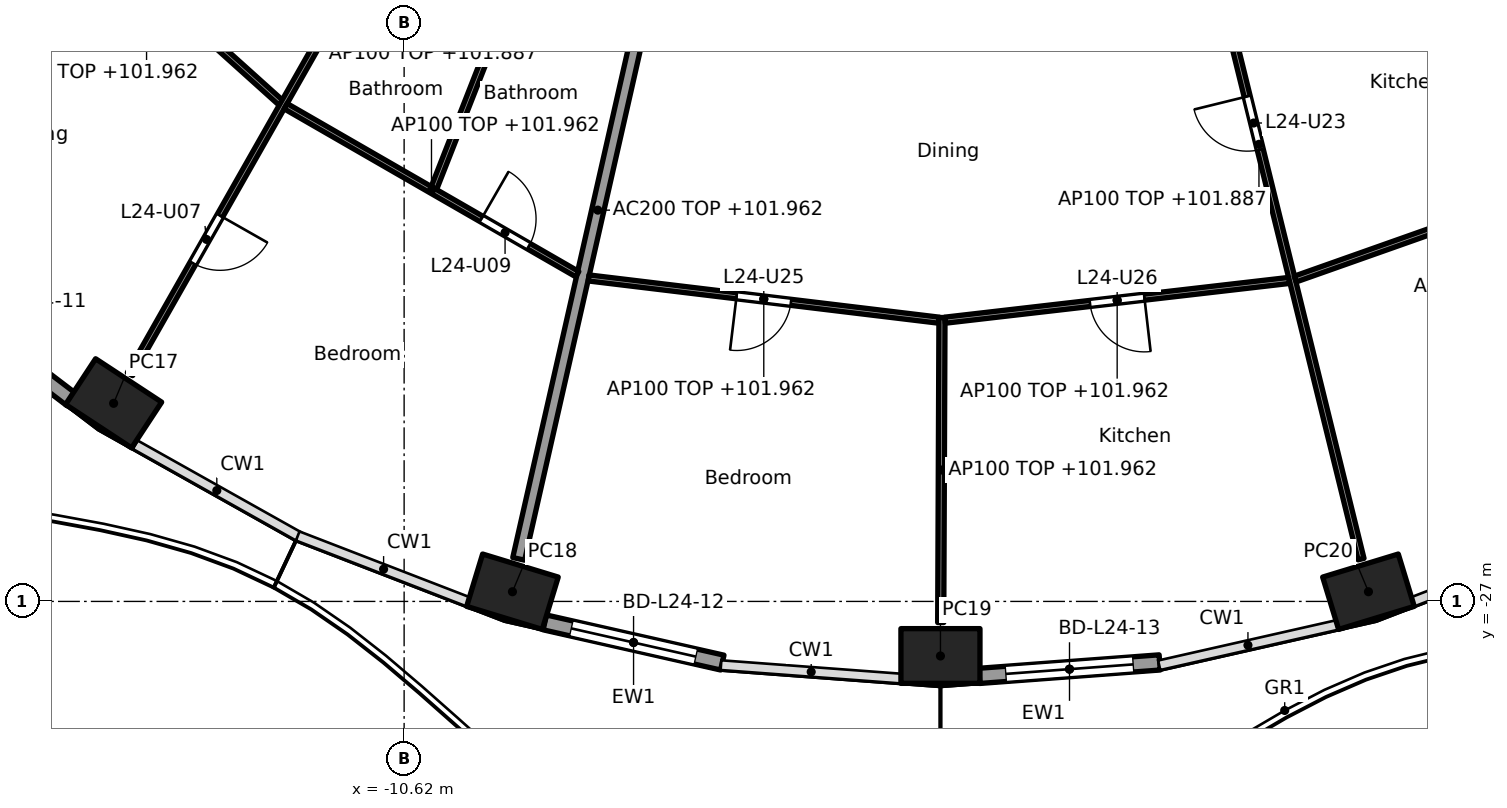
"""IFC4 building model, lengths in metres.
Left out: names, types, materials, properties, quantities, classifications, styles, units other than length and angle.
Written with IfcOpenShell. Run it as: python <this file> out.ifc"""

import sys

from ifc_helpers import new_model, si_unit, direction, frame, frame_2d, origin, origin_2d, place, context, subcontext, project, spatial, rectangle, hollow_rectangle, extrude, element, fill, save


model = new_model("IFC4")
c1 = context("Model", 3, precision=1e-05, world=origin(), true_north=direction((0.0, 1.0)))
c2 = subcontext(c1, "Body", "Model", "MODEL_VIEW")
j1 = project(units=[si_unit("LENGTHUNIT", "METRE"), si_unit("PLANEANGLEUNIT", "RADIAN")], contexts=[c1])
p1 = place(None, origin())
s1 = spatial("IfcSite", under=j1, at=p1, CompositionType="ELEMENT")
p2 = place(p1, origin())
s2 = spatial("IfcBuilding", under=s1, at=p2, CompositionType="ELEMENT")
p3 = place(p2, frame((0.0, 0.0, 99.2)))
s3 = spatial("IfcBuildingStorey", under=s2, at=p3, CompositionType="ELEMENT", Elevation=99.2)
for number, where, z_axis, x_axis in (
    (1, (-15.397, -23.742, 0.0), (0.0, 0.0, 1.0), (0.836, -0.549, 0.0)),
    (2, (-8.839, -26.841, 0.0), (0.0, 0.0, 1.0), (0.957, -0.292, 0.0)),
    (3, (-1.8, -27.897, 0.0), (0.0, 0.0, 1.0), (1.0, 0.0, 0.0)),
    (4, (5.239, -26.841, 0.0), (0.0, 0.0, 1.0), (0.957, 0.292, 0.0)),
):
    element("IfcColumn", number, at=place(p3, frame(where, z_axis=z_axis, x_axis=x_axis)), inside=s3, PredefinedType="COLUMN", context=c2, shape_type="SweptSolid", body=[
        extrude(hollow_rectangle(XDim=1.3, YDim=0.9, WallThickness=0.045, at=origin_2d()), origin(), (0.0, 0.0, 1.0), 3.7),
    ])
p4 = place(p3, frame((-16.089, -23.682, 0.0), z_axis=(0.0, 0.0, 1.0), x_axis=(-0.796037575978, 0.605247203736, 0.0)))
e5 = element("IfcWall", 5, at=p4, inside=s3, PredefinedType="SOLIDWALL", context=c2, shape_type="SweptSolid", body=[
    extrude(rectangle(XDim=3.134, YDim=0.25, at=frame_2d((1.567, 0.0))), origin(), (0.0, 0.0, 1.0), 3.44),
])
p5 = place(p4, frame((0.517, 0.0, 0.0)))
e6 = element("IfcOpeningElement", 6, at=p5, cuts=e5, PredefinedType="OPENING", context=c2, shape_type="SweptSolid", body=[
    extrude(rectangle(XDim=2.1, YDim=2.4, at=frame_2d((1.05, 1.2))), frame((0.0, 0.135, 0.0), z_axis=(0.0, -1.0, 0.0), x_axis=(1.0, 0.0, 0.0)), (0.0, 0.0, 1.0), 0.27),
])
p6 = place(p3, frame((-5.387, -28.006, 0.0), z_axis=(0.0, 0.0, 1.0), x_axis=(-0.975317607872, 0.220806620767, 0.0)))
e7 = element("IfcWall", 7, at=p6, inside=s3, PredefinedType="SOLIDWALL", context=c2, shape_type="SweptSolid", body=[
    extrude(rectangle(XDim=2.993, YDim=0.25, at=frame_2d((1.497, 0.0))), origin(), (0.0, 0.0, 1.0), 3.44),
])
p7 = place(p6, frame((0.447, 0.0, 0.0)))
e8 = element("IfcOpeningElement", 8, at=p7, cuts=e7, PredefinedType="OPENING", context=c2, shape_type="SweptSolid", body=[
    extrude(rectangle(XDim=2.1, YDim=2.4, at=frame_2d((1.05, 1.2))), frame((0.0, 0.135, 0.0), z_axis=(0.0, -1.0, 0.0), x_axis=(1.0, 0.0, 0.0)), (0.0, 0.0, 1.0), 0.27),
])
p8 = place(p3, frame((1.806, -28.003, 0.0), z_axis=(0.0, 0.0, 1.0), x_axis=(-0.997226174467, -0.074430887117, 0.0)))
e9 = element("IfcWall", 9, at=p8, inside=s3, PredefinedType="SOLIDWALL", context=c2, shape_type="SweptSolid", body=[
    extrude(rectangle(XDim=2.975, YDim=0.25, at=frame_2d((1.488, 0.0))), origin(), (0.0, 0.0, 1.0), 3.44),
])
p9 = place(p8, frame((0.438, 0.0, 0.0)))
e10 = element("IfcOpeningElement", 10, at=p9, cuts=e9, PredefinedType="OPENING", context=c2, shape_type="SweptSolid", body=[
    extrude(rectangle(XDim=2.1, YDim=2.4, at=frame_2d((1.05, 1.2))), frame((0.0, 0.135, 0.0), z_axis=(0.0, -1.0, 0.0), x_axis=(1.0, 0.0, 0.0)), (0.0, 0.0, 1.0), 0.27),
])
p10 = place(p3, frame((-6.134, -14.831, 0.0), z_axis=(0.0, 0.0, 1.0), x_axis=(-0.221225405869, -0.975222702667, 0.0)))
e11 = element("IfcWall", 11, at=p10, inside=s3, PredefinedType="PARTITIONING", context=c2, shape_type="SweptSolid", body=[
    extrude(rectangle(XDim=11.761, YDim=0.2, at=frame_2d((5.88, 0.0))), origin(), (0.0, 0.0, 1.0), 2.762),
])
p11 = place(p3, frame((-17.063, -14.827, 0.0), z_axis=(0.0, 0.0, 1.0), x_axis=(0.743478142868, -0.668760234373, 0.0)))
e12 = element("IfcWall", 12, at=p11, inside=s3, PredefinedType="PARTITIONING", context=c2, shape_type="SweptSolid", body=[
    extrude(rectangle(XDim=5.937, YDim=0.1, at=frame_2d((2.969, 0.0))), origin(), (0.0, 0.0, 1.0), 2.762),
])
p12 = place(p11, frame((2.519, 0.0, 0.0)))
e13 = element("IfcOpeningElement", 13, at=p12, cuts=e12, PredefinedType="OPENING", context=c2, shape_type="SweptSolid", body=[
    extrude(rectangle(XDim=0.9, YDim=2.1, at=frame_2d((0.45, 1.05))), frame((0.0, 0.06, 0.0), z_axis=(0.0, -1.0, 0.0), x_axis=(1.0, 0.0, 0.0)), (0.0, 0.0, 1.0), 0.12),
])
p13 = place(p3, frame((-7.707, -10.198, 0.0), z_axis=(0.0, 0.0, 1.0), x_axis=(-0.49395524734, -0.869487328042, 0.0)))
e14 = element("IfcWall", 14, at=p13, inside=s3, PredefinedType="PARTITIONING", context=c2, shape_type="SweptSolid", body=[
    extrude(rectangle(XDim=15.025, YDim=0.1, at=frame_2d((7.512, 0.0))), origin(), (0.0, 0.0, 1.0), 2.687),
])
p14 = place(p13, frame((1.684, 0.0, 0.0)))
e15 = element("IfcOpeningElement", 15, at=p14, cuts=e14, PredefinedType="OPENING", context=c2, shape_type="SweptSolid", body=[
    extrude(rectangle(XDim=0.9, YDim=2.1, at=frame_2d((0.45, 1.05))), frame((0.0, 0.06, 0.0), z_axis=(0.0, -1.0, 0.0), x_axis=(1.0, 0.0, 0.0)), (0.0, 0.0, 1.0), 0.12),
])
p15 = place(p13, frame((6.648, 0.0, 0.0)))
e16 = element("IfcOpeningElement", 16, at=p15, cuts=e14, PredefinedType="OPENING", context=c2, shape_type="SweptSolid", body=[
    extrude(rectangle(XDim=0.9, YDim=2.1, at=frame_2d((0.45, 1.05))), frame((0.0, 0.06, 0.0), z_axis=(0.0, -1.0, 0.0), x_axis=(1.0, 0.0, 0.0)), (0.0, 0.0, 1.0), 0.12),
])
p16 = place(p13, frame((12.027, 0.0, 0.0)))
e17 = element("IfcOpeningElement", 17, at=p16, cuts=e14, PredefinedType="OPENING", context=c2, shape_type="SweptSolid", body=[
    extrude(rectangle(XDim=0.9, YDim=2.1, at=frame_2d((0.45, 1.05))), frame((0.0, 0.06, 0.0), z_axis=(0.0, -1.0, 0.0), x_axis=(1.0, 0.0, 0.0)), (0.0, 0.0, 1.0), 0.12),
])
p17 = place(p3, frame((-12.568, -18.856, 0.0), z_axis=(0.0, 0.0, 1.0), x_axis=(0.866533437451, -0.499119025664, 0.0)))
e18 = element("IfcWall", 18, at=p17, inside=s3, PredefinedType="PARTITIONING", context=c2, shape_type="SweptSolid", body=[
    extrude(rectangle(XDim=5.535, YDim=0.1, at=frame_2d((2.768, 0.0))), origin(), (0.0, 0.0, 1.0), 2.762),
])
p18 = place(p17, frame((3.714, 0.0, 0.0)))
e19 = element("IfcOpeningElement", 19, at=p18, cuts=e18, PredefinedType="OPENING", context=c2, shape_type="SweptSolid", body=[
    extrude(rectangle(XDim=0.9, YDim=2.1, at=frame_2d((0.45, 1.05))), frame((0.0, 0.06, 0.0), z_axis=(0.0, -1.0, 0.0), x_axis=(1.0, 0.0, 0.0)), (0.0, 0.0, 1.0), 0.12),
])
p19 = place(p3, frame((-8.177, -15.231, 0.0), z_axis=(0.0, 0.0, 1.0), x_axis=(-0.365520869553, -0.930803144559, 0.0)))
e20 = element("IfcWall", 20, at=p19, inside=s3, PredefinedType="PARTITIONING", context=c2, shape_type="SweptSolid", body=[
    extrude(rectangle(XDim=5.342, YDim=0.1, at=frame_2d((2.671, 0.0))), origin(), (0.0, 0.0, 1.0), 3.44),
])
p20 = place(p3, frame((-7.586, -21.68, 0.0), z_axis=(0.0, 0.0, 1.0), x_axis=(0.992810189026, -0.119699325668, 0.0)))
e21 = element("IfcWall", 21, at=p20, inside=s3, PredefinedType="PARTITIONING", context=c2, shape_type="SweptSolid", body=[
    extrude(rectangle(XDim=5.803, YDim=0.1, at=frame_2d((2.901, 0.0))), origin(), (0.0, 0.0, 1.0), 2.762),
])
p21 = place(p20, frame((2.451, 0.0, 0.0)))
e22 = element("IfcOpeningElement", 22, at=p21, cuts=e21, PredefinedType="OPENING", context=c2, shape_type="SweptSolid", body=[
    extrude(rectangle(XDim=0.9, YDim=2.1, at=frame_2d((0.45, 1.05))), frame((0.0, 0.06, 0.0), z_axis=(0.0, -1.0, 0.0), x_axis=(1.0, 0.0, 0.0)), (0.0, 0.0, 1.0), 0.12),
])
p22 = place(p3, frame((-1.775, -22.331, 0.0), z_axis=(0.0, 0.0, 1.0), x_axis=(-0.004088153894, -0.999991643464, 0.0)))
e23 = element("IfcWall", 23, at=p22, inside=s3, PredefinedType="PARTITIONING", context=c2, shape_type="SweptSolid", body=[
    extrude(rectangle(XDim=5.016, YDim=0.1, at=frame_2d((2.508, 0.0))), origin(), (0.0, 0.0, 1.0), 2.762),
])
p23 = place(p3, frame((-1.726, -22.375, 0.0), z_axis=(0.0, 0.0, 1.0), x_axis=(0.99339223329, 0.114768771187, 0.0)))
e24 = element("IfcWall", 24, at=p23, inside=s3, PredefinedType="PARTITIONING", context=c2, shape_type="SweptSolid", body=[
    extrude(rectangle(XDim=5.701, YDim=0.1, at=frame_2d((2.851, 0.0))), origin(), (0.0, 0.0, 1.0), 2.762),
])
p24 = place(p23, frame((2.4, 0.0, 0.0)))
e25 = element("IfcOpeningElement", 25, at=p24, cuts=e24, PredefinedType="OPENING", context=c2, shape_type="SweptSolid", body=[
    extrude(rectangle(XDim=0.9, YDim=2.1, at=frame_2d((0.45, 1.05))), frame((0.0, 0.06, 0.0), z_axis=(0.0, -1.0, 0.0), x_axis=(1.0, 0.0, 0.0)), (0.0, 0.0, 1.0), 0.12),
])
p25 = place(p3, frame((1.759, -12.662, 0.0), z_axis=(0.0, 0.0, 1.0), x_axis=(0.239021819854, -0.971014196412, 0.0)))
e26 = element("IfcWall", 26, at=p25, inside=s3, PredefinedType="PARTITIONING", context=c2, shape_type="SweptSolid", body=[
    extrude(rectangle(XDim=14.05, YDim=0.1, at=frame_2d((7.025, 0.0))), origin(), (0.0, 0.0, 1.0), 2.687),
])
p26 = place(p25, frame((6.214, 0.0, 0.0)))
e27 = element("IfcOpeningElement", 27, at=p26, cuts=e26, PredefinedType="OPENING", context=c2, shape_type="SweptSolid", body=[
    extrude(rectangle(XDim=0.9, YDim=2.1, at=frame_2d((0.45, 1.05))), frame((0.0, 0.06, 0.0), z_axis=(0.0, -1.0, 0.0), x_axis=(1.0, 0.0, 0.0)), (0.0, 0.0, 1.0), 0.12),
])
p27 = place(p25, frame((1.552, 0.0, 0.0)))
e28 = element("IfcOpeningElement", 28, at=p27, cuts=e26, PredefinedType="OPENING", context=c2, shape_type="SweptSolid", body=[
    extrude(rectangle(XDim=0.9, YDim=2.1, at=frame_2d((0.45, 1.05))), frame((0.0, 0.06, 0.0), z_axis=(0.0, -1.0, 0.0), x_axis=(1.0, 0.0, 0.0)), (0.0, 0.0, 1.0), 0.12),
])
p28 = place(p3, frame((4.034, -21.698, 0.0), z_axis=(0.0, 0.0, 1.0), x_axis=(0.942864271692, 0.333177077794, 0.0)))
e29 = element("IfcWall", 29, at=p28, inside=s3, PredefinedType="PARTITIONING", context=c2, shape_type="SweptSolid", body=[
    extrude(rectangle(XDim=5.545, YDim=0.1, at=frame_2d((2.772, 0.0))), origin(), (0.0, 0.0, 1.0), 2.762),
])
p29 = place(p7, origin())
e30 = element("IfcDoor", 30, at=p29, inside=s3, OperationType="SLIDING_TO_LEFT", PredefinedType="DOOR", context=c2, shape_type="SweptSolid", body=[
    extrude(rectangle(XDim=2.1, YDim=2.4, at=frame_2d((1.05, 1.2))), frame((0.0, 0.025, 0.0), z_axis=(0.0, -1.0, 0.0), x_axis=(1.0, 0.0, 0.0)), (0.0, 0.0, 1.0), 0.05),
])
fill(e8, e30)
p30 = place(p9, origin())
e31 = element("IfcDoor", 31, at=p30, inside=s3, OperationType="SLIDING_TO_LEFT", PredefinedType="DOOR", context=c2, shape_type="SweptSolid", body=[
    extrude(rectangle(XDim=2.1, YDim=2.4, at=frame_2d((1.05, 1.2))), frame((0.0, 0.025, 0.0), z_axis=(0.0, -1.0, 0.0), x_axis=(1.0, 0.0, 0.0)), (0.0, 0.0, 1.0), 0.05),
])
fill(e10, e31)
p31 = place(p16, origin())
e32 = element("IfcDoor", 32, at=p31, inside=s3, OperationType="SINGLE_SWING_LEFT", PredefinedType="DOOR", context=c2, shape_type="SweptSolid", body=[
    extrude(rectangle(XDim=0.9, YDim=2.1, at=frame_2d((0.45, 1.05))), frame((0.0, 0.025, 0.0), z_axis=(0.0, -1.0, 0.0), x_axis=(1.0, 0.0, 0.0)), (0.0, 0.0, 1.0), 0.05),
])
fill(e17, e32)
p32 = place(p18, origin())
e33 = element("IfcDoor", 33, at=p32, inside=s3, OperationType="SINGLE_SWING_LEFT", PredefinedType="DOOR", context=c2, shape_type="SweptSolid", body=[
    extrude(rectangle(XDim=0.9, YDim=2.1, at=frame_2d((0.45, 1.05))), frame((0.0, 0.025, 0.0), z_axis=(0.0, -1.0, 0.0), x_axis=(1.0, 0.0, 0.0)), (0.0, 0.0, 1.0), 0.05),
])
fill(e19, e33)
p33 = place(p26, frame((0.9, 0.0, 0.0), x_axis=(-1.0, 0.0, 0.0)))
e34 = element("IfcDoor", 34, at=p33, inside=s3, OperationType="SINGLE_SWING_RIGHT", PredefinedType="DOOR", context=c2, shape_type="SweptSolid", body=[
    extrude(rectangle(XDim=0.9, YDim=2.1, at=frame_2d((0.45, 1.05))), frame((0.0, 0.025, 0.0), z_axis=(0.0, -1.0, 0.0), x_axis=(1.0, 0.0, 0.0)), (0.0, 0.0, 1.0), 0.05),
])
fill(e27, e34)
p34 = place(p21, frame((0.9, 0.0, 0.0), x_axis=(-1.0, 0.0, 0.0)))
e35 = element("IfcDoor", 35, at=p34, inside=s3, OperationType="SINGLE_SWING_RIGHT", PredefinedType="DOOR", context=c2, shape_type="SweptSolid", body=[
    extrude(rectangle(XDim=0.9, YDim=2.1, at=frame_2d((0.45, 1.05))), frame((0.0, 0.025, 0.0), z_axis=(0.0, -1.0, 0.0), x_axis=(1.0, 0.0, 0.0)), (0.0, 0.0, 1.0), 0.05),
])
fill(e22, e35)
p35 = place(p24, frame((0.9, 0.0, 0.0), x_axis=(-1.0, 0.0, 0.0)))
e36 = element("IfcDoor", 36, at=p35, inside=s3, OperationType="SINGLE_SWING_LEFT", PredefinedType="DOOR", context=c2, shape_type="SweptSolid", body=[
    extrude(rectangle(XDim=0.9, YDim=2.1, at=frame_2d((0.45, 1.05))), frame((0.0, 0.025, 0.0), z_axis=(0.0, -1.0, 0.0), x_axis=(1.0, 0.0, 0.0)), (0.0, 0.0, 1.0), 0.05),
])
fill(e25, e36)
save(model, sys.argv[1])
